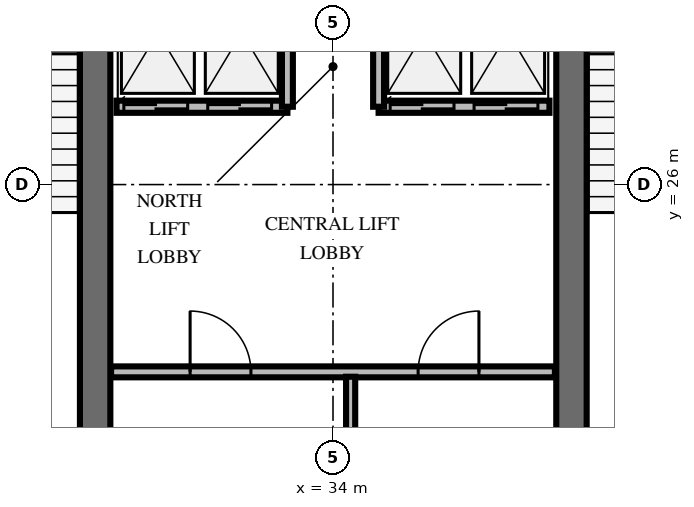
"""IFC4 building model, lengths in metres.
Left out: names, types, materials, properties, quantities, classifications, styles, units other than length and angle.
Written with IfcOpenShell. Run it as: python <this file> out.ifc"""

import sys

from ifc_helpers import new_model, si_unit, direction, frame, frame_2d, origin, place, context, subcontext, project, spatial, rectangle, extrude, element, fill, save


model = new_model("IFC4")
c1 = context("Model", 3, precision=1e-05, world=origin(), true_north=direction((0.0, 1.0)))
c2 = subcontext(c1, "Body", "Model", "MODEL_VIEW")
j1 = project(units=[si_unit("LENGTHUNIT", "METRE"), si_unit("PLANEANGLEUNIT", "RADIAN")], contexts=[c1])
p1 = place(None, origin())
s1 = spatial("IfcSite", under=j1, at=p1, CompositionType="ELEMENT")
p2 = place(p1, origin())
s2 = spatial("IfcBuilding", under=s1, at=p2, CompositionType="ELEMENT")
p3 = place(p2, frame((0.0, 0.0, 259.2)))
s3 = spatial("IfcBuildingStorey", under=s2, at=p3, CompositionType="ELEMENT", Elevation=259.2)
for number, where, z_axis, x_axis in (
    (1, (30.088, 20.262, 0.0), (0.0, 0.0, 1.0), (0.0, 1.0, 0.0)),
    (2, (37.922, 20.262, 0.0), (0.0, 0.0, 1.0), (0.0, 1.0, 0.0)),
):
    element("IfcWall", number, at=place(p3, frame(where, z_axis=z_axis, x_axis=x_axis)), inside=s3, PredefinedType="SHEAR", context=c2, shape_type="SweptSolid", body=[
        extrude(rectangle(XDim=9.676, YDim=0.5, at=frame_2d((4.838, 0.0))), origin(), (0.0, 0.0, 1.0), 3.6),
    ])
p4 = place(p3, frame((30.35, 22.92, 0.0), z_axis=(0.0, 0.0, 1.0), x_axis=(1.0, 0.0, 0.0)))
e3 = element("IfcWall", 3, at=p4, inside=s3, PredefinedType="PARTITIONING", context=c2, shape_type="SweptSolid", body=[
    extrude(rectangle(XDim=7.3, YDim=0.18, at=frame_2d((3.65, 0.0))), origin(), (0.0, 0.0, 1.0), 2.46),
])
p5 = place(p4, frame((1.3, 0.0, 0.0)))
e4 = element("IfcOpeningElement", 4, at=p5, cuts=e3, PredefinedType="OPENING", context=c2, shape_type="SweptSolid", body=[
    extrude(rectangle(XDim=1.0, YDim=2.15, at=frame_2d((0.5, 1.075))), frame((0.0, 0.1, 0.0), z_axis=(0.0, -1.0, 0.0), x_axis=(1.0, 0.0, 0.0)), (0.0, 0.0, 1.0), 0.2),
])
p6 = place(p4, frame((5.05, 0.0, 0.0)))
e5 = element("IfcOpeningElement", 5, at=p6, cuts=e3, PredefinedType="OPENING", context=c2, shape_type="SweptSolid", body=[
    extrude(rectangle(XDim=1.0, YDim=2.15, at=frame_2d((0.5, 1.075))), frame((0.0, 0.1, 0.0), z_axis=(0.0, -1.0, 0.0), x_axis=(1.0, 0.0, 0.0)), (0.0, 0.0, 1.0), 0.2),
])
p7 = place(p3, frame((34.29, 20.5, 0.0), z_axis=(0.0, 0.0, 1.0), x_axis=(0.0, 1.0, 0.0)))
e6 = element("IfcWall", 6, at=p7, inside=s3, PredefinedType="PARTITIONING", context=c2, shape_type="SweptSolid", body=[
    extrude(rectangle(XDim=2.34, YDim=0.15, at=frame_2d((1.17, 0.0))), origin(), (0.0, 0.0, 1.0), 2.46),
])
p8 = place(p3, frame((30.44, 27.28, 0.0), z_axis=(0.0, 0.0, 1.0), x_axis=(1.0, 0.0, 0.0)))
e7 = element("IfcWall", 7, at=p8, inside=s3, PredefinedType="SOLIDWALL", context=c2, shape_type="SweptSolid", body=[
    extrude(rectangle(XDim=2.81, YDim=0.2, at=frame_2d((1.405, 0.0))), origin(), (0.0, 0.0, 1.0), 2.46),
])
p9 = place(p8, frame((0.12, 0.0, 0.0)))
e8 = element("IfcOpeningElement", 8, at=p9, cuts=e7, PredefinedType="OPENING", context=c2, shape_type="SweptSolid", body=[
    extrude(rectangle(XDim=1.05, YDim=2.1, at=frame_2d((0.525, 1.05))), frame((0.0, 0.11, 0.0), z_axis=(0.0, -1.0, 0.0), x_axis=(1.0, 0.0, 0.0)), (0.0, 0.0, 1.0), 0.22),
])
p10 = place(p8, frame((1.5, 0.0, 0.0)))
e9 = element("IfcOpeningElement", 9, at=p10, cuts=e7, PredefinedType="OPENING", context=c2, shape_type="SweptSolid", body=[
    extrude(rectangle(XDim=1.05, YDim=2.1, at=frame_2d((0.525, 1.05))), frame((0.0, 0.11, 0.0), z_axis=(0.0, -1.0, 0.0), x_axis=(1.0, 0.0, 0.0)), (0.0, 0.0, 1.0), 0.22),
])
p11 = place(p3, frame((33.25, 27.28, 0.0), z_axis=(0.0, 0.0, 1.0), x_axis=(0.0, 1.0, 0.0)))
e10 = element("IfcWall", 10, at=p11, inside=s3, PredefinedType="SOLIDWALL", context=c2, shape_type="SweptSolid", body=[
    extrude(rectangle(XDim=2.47, YDim=0.18, at=frame_2d((1.235, 0.0))), origin(), (0.0, 0.0, 1.0), 2.46),
])
p12 = place(p3, frame((34.75, 27.28, 0.0), z_axis=(0.0, 0.0, 1.0), x_axis=(1.0, 0.0, 0.0)))
e11 = element("IfcWall", 11, at=p12, inside=s3, PredefinedType="SOLIDWALL", context=c2, shape_type="SweptSolid", body=[
    extrude(rectangle(XDim=2.81, YDim=0.2, at=frame_2d((1.405, 0.0))), origin(), (0.0, 0.0, 1.0), 2.46),
])
p13 = place(p12, frame((0.19, 0.0, 0.0)))
e12 = element("IfcOpeningElement", 12, at=p13, cuts=e11, PredefinedType="OPENING", context=c2, shape_type="SweptSolid", body=[
    extrude(rectangle(XDim=1.05, YDim=2.1, at=frame_2d((0.525, 1.05))), frame((0.0, 0.11, 0.0), z_axis=(0.0, -1.0, 0.0), x_axis=(1.0, 0.0, 0.0)), (0.0, 0.0, 1.0), 0.22),
])
p14 = place(p12, frame((1.57, 0.0, 0.0)))
e13 = element("IfcOpeningElement", 13, at=p14, cuts=e11, PredefinedType="OPENING", context=c2, shape_type="SweptSolid", body=[
    extrude(rectangle(XDim=1.05, YDim=2.1, at=frame_2d((0.525, 1.05))), frame((0.0, 0.11, 0.0), z_axis=(0.0, -1.0, 0.0), x_axis=(1.0, 0.0, 0.0)), (0.0, 0.0, 1.0), 0.22),
])
p15 = place(p3, frame((34.75, 27.28, 0.0), z_axis=(0.0, 0.0, 1.0), x_axis=(0.0, 1.0, 0.0)))
e14 = element("IfcWall", 14, at=p15, inside=s3, PredefinedType="SOLIDWALL", context=c2, shape_type="SweptSolid", body=[
    extrude(rectangle(XDim=2.47, YDim=0.18, at=frame_2d((1.235, 0.0))), origin(), (0.0, 0.0, 1.0), 2.46),
])
p16 = place(p5, origin())
e15 = element("IfcDoor", 15, at=p16, inside=s3, OperationType="SINGLE_SWING_LEFT", PredefinedType="DOOR", context=c2, shape_type="SweptSolid", body=[
    extrude(rectangle(XDim=1.0, YDim=2.15, at=frame_2d((0.5, 1.075))), frame((0.0, 0.025, 0.0), z_axis=(0.0, -1.0, 0.0), x_axis=(1.0, 0.0, 0.0)), (0.0, 0.0, 1.0), 0.05),
])
fill(e4, e15)
p17 = place(p6, origin())
e16 = element("IfcDoor", 16, at=p17, inside=s3, OperationType="SINGLE_SWING_RIGHT", PredefinedType="DOOR", context=c2, shape_type="SweptSolid", body=[
    extrude(rectangle(XDim=1.0, YDim=2.15, at=frame_2d((0.5, 1.075))), frame((0.0, 0.025, 0.0), z_axis=(0.0, -1.0, 0.0), x_axis=(1.0, 0.0, 0.0)), (0.0, 0.0, 1.0), 0.05),
])
fill(e5, e16)
p18 = place(p9, origin())
e17 = element("IfcDoor", 17, at=p18, inside=s3, OperationType="DOUBLE_DOOR_SLIDING", PredefinedType="USERDEFINED", context=c2, shape_type="SweptSolid", body=[
    extrude(rectangle(XDim=1.05, YDim=2.1, at=frame_2d((0.525, 1.05))), frame((0.0, 0.025, 0.0), z_axis=(0.0, -1.0, 0.0), x_axis=(1.0, 0.0, 0.0)), (0.0, 0.0, 1.0), 0.05),
])
fill(e8, e17)
p19 = place(p10, origin())
e18 = element("IfcDoor", 18, at=p19, inside=s3, OperationType="DOUBLE_DOOR_SLIDING", PredefinedType="USERDEFINED", context=c2, shape_type="SweptSolid", body=[
    extrude(rectangle(XDim=1.05, YDim=2.1, at=frame_2d((0.525, 1.05))), frame((0.0, 0.025, 0.0), z_axis=(0.0, -1.0, 0.0), x_axis=(1.0, 0.0, 0.0)), (0.0, 0.0, 1.0), 0.05),
])
fill(e9, e18)
p20 = place(p13, origin())
e19 = element("IfcDoor", 19, at=p20, inside=s3, OperationType="DOUBLE_DOOR_SLIDING", PredefinedType="USERDEFINED", context=c2, shape_type="SweptSolid", body=[
    extrude(rectangle(XDim=1.05, YDim=2.1, at=frame_2d((0.525, 1.05))), frame((0.0, 0.025, 0.0), z_axis=(0.0, -1.0, 0.0), x_axis=(1.0, 0.0, 0.0)), (0.0, 0.0, 1.0), 0.05),
])
fill(e12, e19)
p21 = place(p14, origin())
e20 = element("IfcDoor", 20, at=p21, inside=s3, OperationType="DOUBLE_DOOR_SLIDING", PredefinedType="USERDEFINED", context=c2, shape_type="SweptSolid", body=[
    extrude(rectangle(XDim=1.05, YDim=2.1, at=frame_2d((0.525, 1.05))), frame((0.0, 0.025, 0.0), z_axis=(0.0, -1.0, 0.0), x_axis=(1.0, 0.0, 0.0)), (0.0, 0.0, 1.0), 0.05),
])
fill(e13, e20)
save(model, sys.argv[1])
